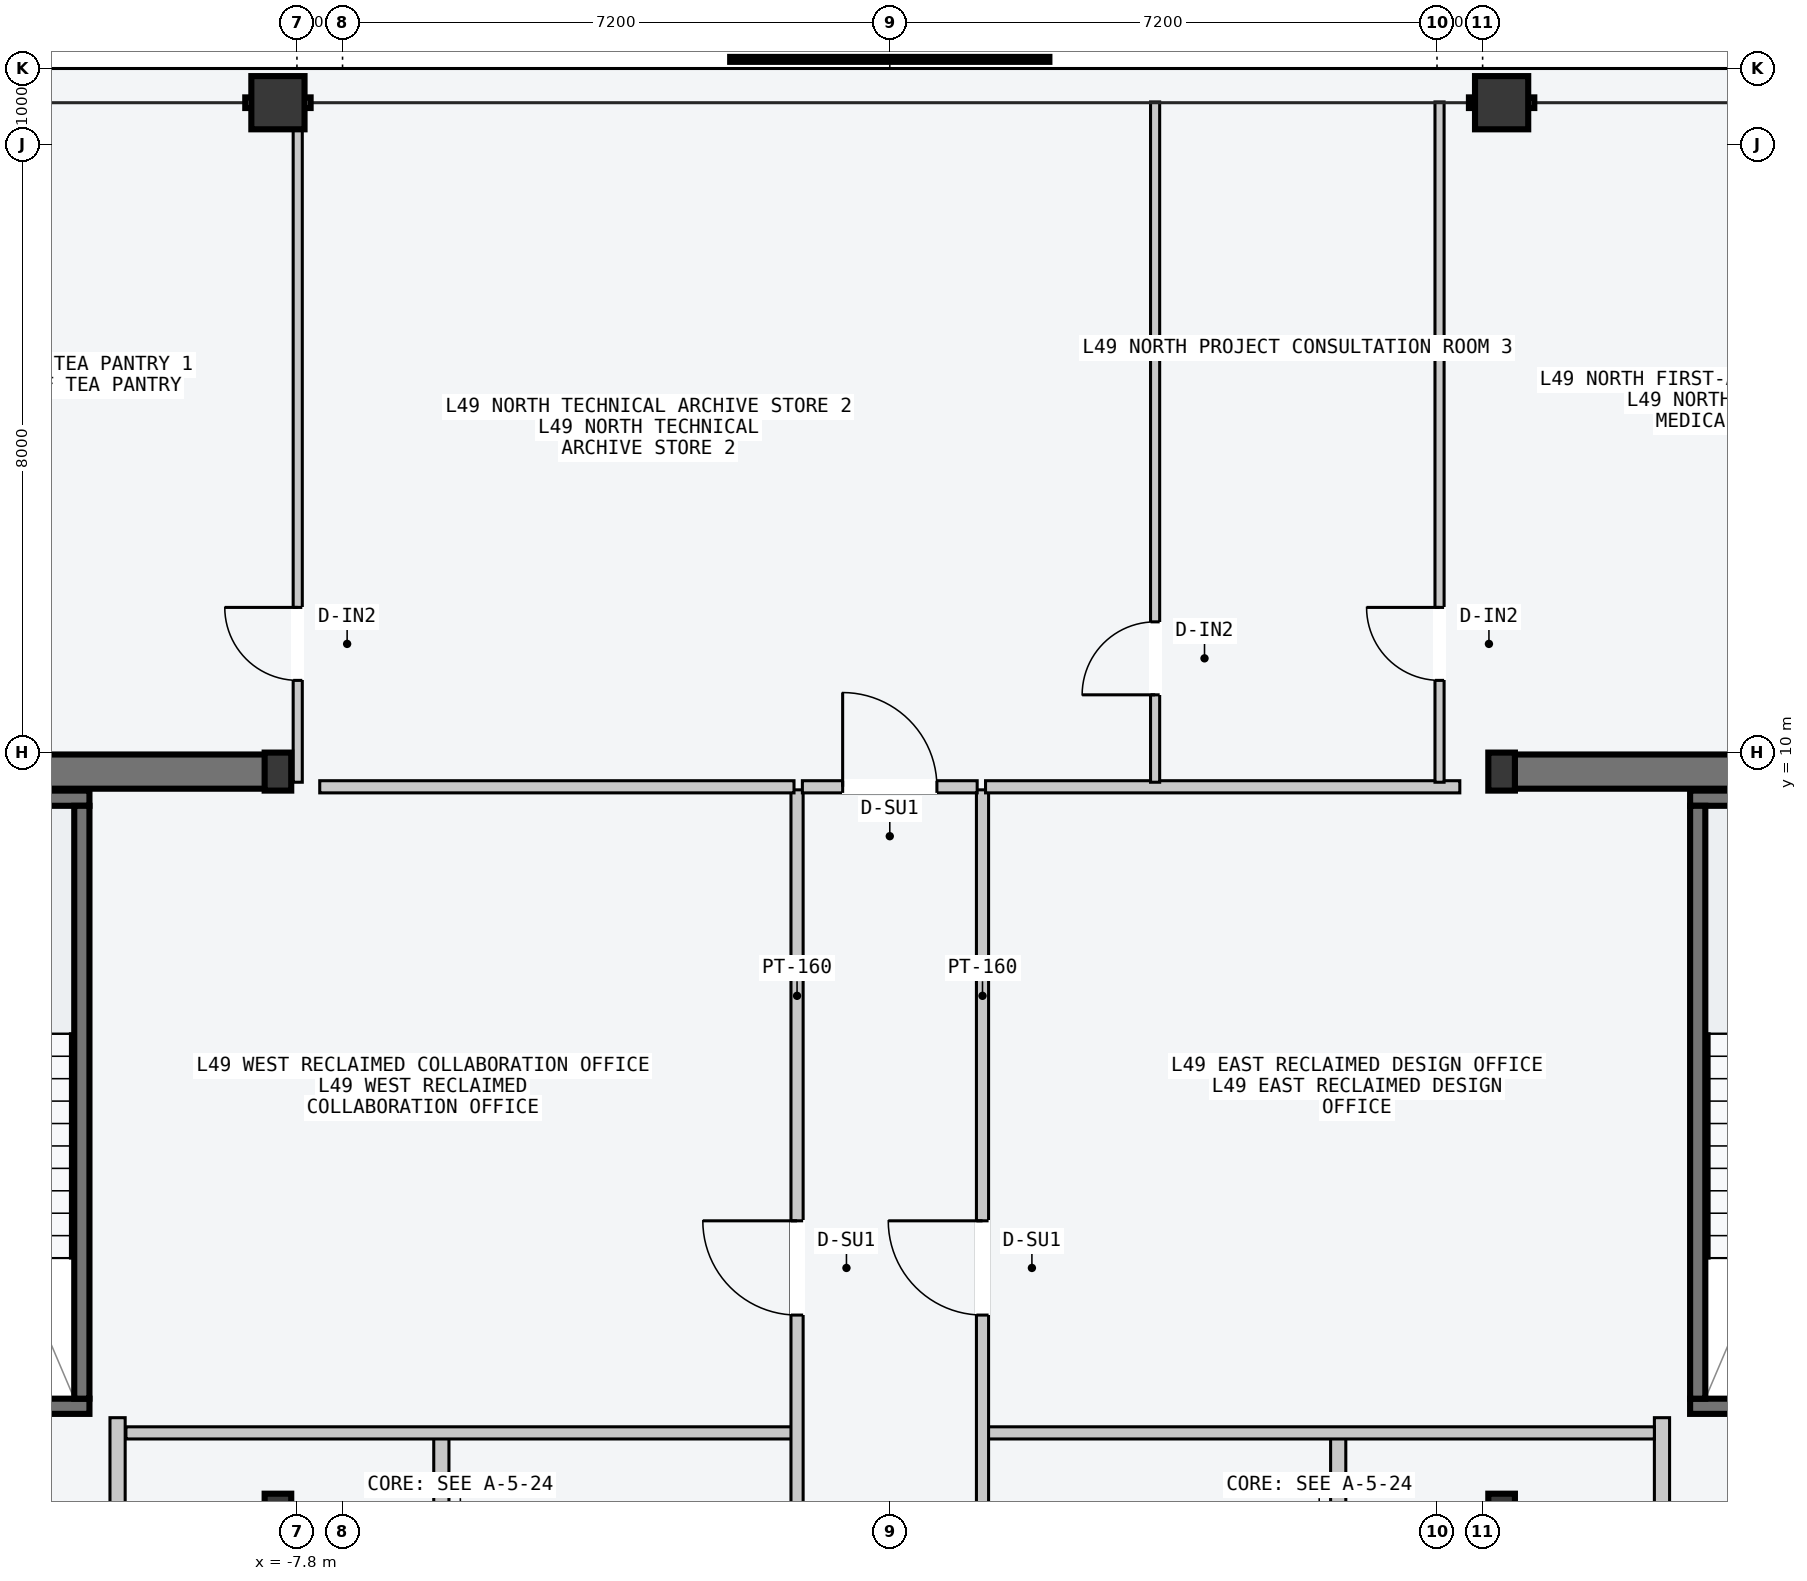
"""IFC4 building model, lengths in metres.
Left out: names, types, materials, properties, quantities, classifications, styles, units other than length and angle.
Written with IfcOpenShell. Run it as: python <this file> out.ifc"""

import sys

from ifc_helpers import new_model, si_unit, direction, frame, frame_2d, origin, origin_2d, place, context, subcontext, project, spatial, rectangle, hollow_rectangle, i_section, extrude, element, fill, save


model = new_model("IFC4")
c1 = context("Model", 3, precision=1e-05, world=origin(), true_north=direction((0.0, 1.0)))
c2 = subcontext(c1, "Body", "Model", "MODEL_VIEW")
j1 = project(units=[si_unit("LENGTHUNIT", "METRE"), si_unit("PLANEANGLEUNIT", "RADIAN")], contexts=[c1])
p1 = place(None, origin())
s1 = spatial("IfcSite", under=j1, at=p1, CompositionType="ELEMENT")
p2 = place(p1, origin())
s2 = spatial("IfcBuilding", under=s1, at=p2, CompositionType="ELEMENT")
p3 = place(p2, frame((0.0, 0.0, 187.5)))
s3 = spatial("IfcBuildingStorey", under=s2, at=p3, CompositionType="ELEMENT", Elevation=187.5)
for number, where, z_axis, x_axis in (
    (1, (-14.53, 9.75, -0.2), (0.0, 0.0, 1.0), (1.0, 0.0, 0.0)),
    (2, (8.07, 9.75, -0.2), (0.0, 0.0, 1.0), (1.0, 0.0, 0.0)),
):
    element("IfcWall", number, at=place(p3, frame(where, z_axis=z_axis, x_axis=x_axis)), inside=s3, PredefinedType="SHEAR", context=c2, shape_type="SweptSolid", body=[
        extrude(rectangle(XDim=6.46, YDim=0.45, at=frame_2d((3.23, 0.0))), origin(), (0.0, 0.0, 1.0), 3.6),
    ])
p4 = place(p3, frame((-14.25, 1.4, -0.2), z_axis=(0.0, 0.0, 1.0), x_axis=(1.0, 0.0, 0.0)))
e3 = element("IfcWall", 3, at=p4, inside=s3, PredefinedType="SOLIDWALL", context=c2, shape_type="SweptSolid", body=[
    extrude(rectangle(XDim=3.72, YDim=0.2, at=frame_2d((1.86, 0.0))), origin(), (0.0, 0.0, 1.0), 3.6),
])
p5 = place(p4, frame((1.5, 0.0, 0.2)))
e4 = element("IfcOpeningElement", 4, at=p5, cuts=e3, PredefinedType="OPENING", context=c2, shape_type="SweptSolid", body=[
    extrude(rectangle(XDim=1.12, YDim=2.18, at=frame_2d((0.56, 1.09))), frame((0.0, 0.11, 0.0), z_axis=(0.0, -1.0, 0.0), x_axis=(1.0, 0.0, 0.0)), (0.0, 0.0, 1.0), 0.22),
])
p6 = place(p3, frame((-14.25, 9.4, -0.2), z_axis=(0.0, 0.0, 1.0), x_axis=(1.0, 0.0, 0.0)))
e5 = element("IfcWall", 5, at=p6, inside=s3, PredefinedType="SOLIDWALL", context=c2, shape_type="SweptSolid", body=[
    extrude(rectangle(XDim=3.72, YDim=0.2, at=frame_2d((1.86, 0.0))), origin(), (0.0, 0.0, 1.0), 3.6),
])
p7 = place(p3, frame((-10.63, 1.5, -0.2), z_axis=(0.0, 0.0, 1.0), x_axis=(0.0, 1.0, 0.0)))
e6 = element("IfcWall", 6, at=p7, inside=s3, PredefinedType="SOLIDWALL", context=c2, shape_type="SweptSolid", body=[
    extrude(rectangle(XDim=7.8, YDim=0.2, at=frame_2d((3.9, 0.0))), origin(), (0.0, 0.0, 1.0), 3.6),
])
p8 = place(p3, frame((10.53, 1.4, -0.2), z_axis=(0.0, 0.0, 1.0), x_axis=(1.0, 0.0, 0.0)))
e7 = element("IfcWall", 7, at=p8, inside=s3, PredefinedType="SOLIDWALL", context=c2, shape_type="SweptSolid", body=[
    extrude(rectangle(XDim=3.72, YDim=0.2, at=frame_2d((1.86, 0.0))), origin(), (0.0, 0.0, 1.0), 3.6),
])
p9 = place(p8, frame((1.5, 0.0, 0.2)))
e8 = element("IfcOpeningElement", 8, at=p9, cuts=e7, PredefinedType="OPENING", context=c2, shape_type="SweptSolid", body=[
    extrude(rectangle(XDim=1.12, YDim=2.18, at=frame_2d((0.56, 1.09))), frame((0.0, 0.11, 0.0), z_axis=(0.0, -1.0, 0.0), x_axis=(1.0, 0.0, 0.0)), (0.0, 0.0, 1.0), 0.22),
])
p10 = place(p3, frame((10.53, 9.4, -0.2), z_axis=(0.0, 0.0, 1.0), x_axis=(1.0, 0.0, 0.0)))
e9 = element("IfcWall", 9, at=p10, inside=s3, PredefinedType="SOLIDWALL", context=c2, shape_type="SweptSolid", body=[
    extrude(rectangle(XDim=3.72, YDim=0.2, at=frame_2d((1.86, 0.0))), origin(), (0.0, 0.0, 1.0), 3.6),
])
p11 = place(p3, frame((10.63, 1.5, -0.2), z_axis=(0.0, 0.0, 1.0), x_axis=(0.0, 1.0, 0.0)))
e10 = element("IfcWall", 10, at=p11, inside=s3, PredefinedType="SOLIDWALL", context=c2, shape_type="SweptSolid", body=[
    extrude(rectangle(XDim=7.8, YDim=0.2, at=frame_2d((3.9, 0.0))), origin(), (0.0, 0.0, 1.0), 3.6),
])
for number, where, z_axis, x_axis in (
    (11, (-8.05, 0.0, 0.0), (0.0, 0.0, 1.0), (1.0, 0.0, 0.0)),
    (12, (-8.05, 9.75, 0.0), (0.0, 0.0, 1.0), (1.0, 0.0, 0.0)),
    (13, (8.05, 0.0, 0.0), (0.0, 0.0, 1.0), (1.0, 0.0, 0.0)),
    (14, (8.05, 9.75, 0.0), (0.0, 0.0, 1.0), (1.0, 0.0, 0.0)),
):
    element("IfcColumn", number, at=place(p3, frame(where, z_axis=z_axis, x_axis=x_axis)), inside=s3, PredefinedType="COLUMN", context=c2, shape_type="SweptSolid", body=[
        extrude(i_section(OverallWidth=0.35, OverallDepth=0.5, WebThickness=0.02, FlangeThickness=0.032, at=origin_2d()), origin(), (0.0, 0.0, 1.0), 3.6),
    ])
for number, where, z_axis, x_axis in (
    (15, (-8.05, 18.55, 0.0), (0.0, 0.0, 1.0), (1.0, 0.0, 0.0)),
    (16, (8.05, 18.55, 0.0), (0.0, 0.0, 1.0), (1.0, 0.0, 0.0)),
):
    element("IfcColumn", number, at=place(p3, frame(where, z_axis=z_axis, x_axis=x_axis)), inside=s3, PredefinedType="COLUMN", context=c2, shape_type="SweptSolid", body=[
        extrude(hollow_rectangle(XDim=0.7, YDim=0.7, WallThickness=0.03, at=origin_2d()), origin(), (0.0, 0.0, 1.0), 3.6),
    ])
p12 = place(p3, frame((-5.9, -9.45, 0.0), z_axis=(0.0, 0.0, 1.0), x_axis=(0.0, 1.0, 0.0)))
e17 = element("IfcWall", 17, at=p12, inside=s3, PredefinedType="PARTITIONING", context=c2, shape_type="SweptSolid", body=[
    extrude(rectangle(XDim=10.5, YDim=0.2, at=frame_2d((5.25, 0.0))), origin(), (0.0, 0.0, 1.0), 3.4),
])
p13 = place(p12, frame((3.9, 0.0, 0.0)))
e18 = element("IfcOpeningElement", 18, at=p13, cuts=e17, PredefinedType="OPENING", context=c2, shape_type="SweptSolid", body=[
    extrude(rectangle(XDim=1.5, YDim=2.2, at=frame_2d((0.75, 1.1))), frame((0.0, 0.11, 0.0), z_axis=(0.0, -1.0, 0.0), x_axis=(1.0, 0.0, 0.0)), (0.0, 0.0, 1.0), 0.22),
])
p14 = place(p3, frame((-10.16, -2.55, 0.0), z_axis=(0.0, 0.0, 1.0), x_axis=(0.0, 1.0, 0.0)))
e19 = element("IfcWall", 19, at=p14, inside=s3, PredefinedType="PARTITIONING", context=c2, shape_type="SweptSolid", body=[
    extrude(rectangle(XDim=3.8, YDim=0.2, at=frame_2d((1.9, 0.0))), origin(), (0.0, 0.0, 1.0), 3.4),
])
p15 = place(p14, frame((1.3, 0.0, 0.0)))
e20 = element("IfcOpeningElement", 20, at=p15, cuts=e19, PredefinedType="OPENING", context=c2, shape_type="SweptSolid", body=[
    extrude(rectangle(XDim=1.1, YDim=2.15, at=frame_2d((0.55, 1.075))), frame((0.0, 0.11, 0.0), z_axis=(0.0, -1.0, 0.0), x_axis=(1.0, 0.0, 0.0)), (0.0, 0.0, 1.0), 0.22),
])
p16 = place(p3, frame((5.9, -9.45, 0.0), z_axis=(0.0, 0.0, 1.0), x_axis=(0.0, 1.0, 0.0)))
e21 = element("IfcWall", 21, at=p16, inside=s3, PredefinedType="PARTITIONING", context=c2, shape_type="SweptSolid", body=[
    extrude(rectangle(XDim=10.5, YDim=0.2, at=frame_2d((5.25, 0.0))), origin(), (0.0, 0.0, 1.0), 3.4),
])
p17 = place(p16, frame((3.9, 0.0, 0.0)))
e22 = element("IfcOpeningElement", 22, at=p17, cuts=e21, PredefinedType="OPENING", context=c2, shape_type="SweptSolid", body=[
    extrude(rectangle(XDim=1.5, YDim=2.2, at=frame_2d((0.75, 1.1))), frame((0.0, 0.11, 0.0), z_axis=(0.0, -1.0, 0.0), x_axis=(1.0, 0.0, 0.0)), (0.0, 0.0, 1.0), 0.22),
])
p18 = place(p3, frame((10.16, -2.55, 0.0), z_axis=(0.0, 0.0, 1.0), x_axis=(0.0, 1.0, 0.0)))
e23 = element("IfcWall", 23, at=p18, inside=s3, PredefinedType="PARTITIONING", context=c2, shape_type="SweptSolid", body=[
    extrude(rectangle(XDim=3.8, YDim=0.2, at=frame_2d((1.9, 0.0))), origin(), (0.0, 0.0, 1.0), 3.4),
])
p19 = place(p18, frame((1.3, 0.0, 0.0)))
e24 = element("IfcOpeningElement", 24, at=p19, cuts=e23, PredefinedType="OPENING", context=c2, shape_type="SweptSolid", body=[
    extrude(rectangle(XDim=1.1, YDim=2.15, at=frame_2d((0.55, 1.075))), frame((0.0, 0.11, 0.0), z_axis=(0.0, -1.0, 0.0), x_axis=(1.0, 0.0, 0.0)), (0.0, 0.0, 1.0), 0.22),
])
p20 = place(p3, frame((-10.05, 1.05, 0.0), z_axis=(0.0, 0.0, 1.0), x_axis=(1.0, 0.0, 0.0)))
e25 = element("IfcWall", 25, at=p20, inside=s3, PredefinedType="PARTITIONING", context=c2, shape_type="SweptSolid", body=[
    extrude(rectangle(XDim=8.79, YDim=0.16, at=frame_2d((4.395, 0.0))), origin(), (0.0, 0.0, 1.0), 3.4),
])
p21 = place(p3, frame((-1.22, -3.5, 0.0), z_axis=(0.0, 0.0, 1.0), x_axis=(0.0, 1.0, 0.0)))
e26 = element("IfcWall", 26, at=p21, inside=s3, PredefinedType="PARTITIONING", context=c2, shape_type="SweptSolid", body=[
    extrude(rectangle(XDim=13.01, YDim=0.16, at=frame_2d((6.505, 0.0))), origin(), (0.0, 0.0, 1.0), 3.4),
])
p22 = place(p21, frame((6.1, 0.0, 0.0)))
e27 = element("IfcOpeningElement", 27, at=p22, cuts=e26, PredefinedType="OPENING", context=c2, shape_type="SweptSolid", body=[
    extrude(rectangle(XDim=1.24, YDim=2.24, at=frame_2d((0.62, 1.12))), frame((0.0, 0.09, 0.0), z_axis=(0.0, -1.0, 0.0), x_axis=(1.0, 0.0, 0.0)), (0.0, 0.0, 1.0), 0.18),
])
p23 = place(p21, frame((1.6, 0.0, 0.0)))
e28 = element("IfcOpeningElement", 28, at=p23, cuts=e26, PredefinedType="OPENING", context=c2, shape_type="SweptSolid", body=[
    extrude(rectangle(XDim=0.96, YDim=2.18, at=frame_2d((0.48, 1.09))), frame((0.0, 0.09, 0.0), z_axis=(0.0, -1.0, 0.0), x_axis=(1.0, 0.0, 0.0)), (0.0, 0.0, 1.0), 0.18),
])
p24 = place(p3, frame((-7.5, 9.55, 0.0), z_axis=(0.0, 0.0, 1.0), x_axis=(1.0, 0.0, 0.0)))
e29 = element("IfcWall", 29, at=p24, inside=s3, PredefinedType="PARTITIONING", context=c2, shape_type="SweptSolid", body=[
    extrude(rectangle(XDim=6.24, YDim=0.16, at=frame_2d((3.12, 0.0))), origin(), (0.0, 0.0, 1.0), 3.4),
])
p25 = place(p3, frame((1.26, 1.05, 0.0), z_axis=(0.0, 0.0, 1.0), x_axis=(1.0, 0.0, 0.0)))
e30 = element("IfcWall", 30, at=p25, inside=s3, PredefinedType="PARTITIONING", context=c2, shape_type="SweptSolid", body=[
    extrude(rectangle(XDim=8.8, YDim=0.16, at=frame_2d((4.4, 0.0))), origin(), (0.0, 0.0, 1.0), 3.4),
])
p26 = place(p3, frame((1.22, -3.5, 0.0), z_axis=(0.0, 0.0, 1.0), x_axis=(0.0, 1.0, 0.0)))
e31 = element("IfcWall", 31, at=p26, inside=s3, PredefinedType="PARTITIONING", context=c2, shape_type="SweptSolid", body=[
    extrude(rectangle(XDim=13.01, YDim=0.16, at=frame_2d((6.505, 0.0))), origin(), (0.0, 0.0, 1.0), 3.4),
])
p27 = place(p26, frame((6.1, 0.0, 0.0)))
e32 = element("IfcOpeningElement", 32, at=p27, cuts=e31, PredefinedType="OPENING", context=c2, shape_type="SweptSolid", body=[
    extrude(rectangle(XDim=1.24, YDim=2.24, at=frame_2d((0.62, 1.12))), frame((0.0, 0.09, 0.0), z_axis=(0.0, -1.0, 0.0), x_axis=(1.0, 0.0, 0.0)), (0.0, 0.0, 1.0), 0.18),
])
p28 = place(p26, frame((1.6, 0.0, 0.0)))
e33 = element("IfcOpeningElement", 33, at=p28, cuts=e31, PredefinedType="OPENING", context=c2, shape_type="SweptSolid", body=[
    extrude(rectangle(XDim=0.96, YDim=2.18, at=frame_2d((0.48, 1.09))), frame((0.0, 0.09, 0.0), z_axis=(0.0, -1.0, 0.0), x_axis=(1.0, 0.0, 0.0)), (0.0, 0.0, 1.0), 0.18),
])
p29 = place(p3, frame((1.26, 9.55, 0.0), z_axis=(0.0, 0.0, 1.0), x_axis=(1.0, 0.0, 0.0)))
e34 = element("IfcWall", 34, at=p29, inside=s3, PredefinedType="PARTITIONING", context=c2, shape_type="SweptSolid", body=[
    extrude(rectangle(XDim=6.24, YDim=0.16, at=frame_2d((3.12, 0.0))), origin(), (0.0, 0.0, 1.0), 3.4),
])
p30 = place(p3, frame((-7.79, 9.61, 0.0), z_axis=(0.0, 0.0, 1.0), x_axis=(0.0, 1.0, 0.0)))
e35 = element("IfcWall", 35, at=p30, inside=s3, PredefinedType="PARTITIONING", context=c2, shape_type="SweptSolid", body=[
    extrude(rectangle(XDim=8.95, YDim=0.12, at=frame_2d((4.475, 0.0))), origin(), (0.0, 0.0, 1.0), 3.4),
])
p31 = place(p30, frame((1.34, 0.0, 0.0)))
e36 = element("IfcOpeningElement", 36, at=p31, cuts=e35, PredefinedType="OPENING", context=c2, shape_type="SweptSolid", body=[
    extrude(rectangle(XDim=0.96, YDim=2.18, at=frame_2d((0.48, 1.09))), frame((0.0, 0.07, 0.0), z_axis=(0.0, -1.0, 0.0), x_axis=(1.0, 0.0, 0.0)), (0.0, 0.0, 1.0), 0.14),
])
p32 = place(p3, frame((3.491, 9.61, 0.0), z_axis=(0.0, 0.0, 1.0), x_axis=(0.0, 1.0, 0.0)))
e37 = element("IfcWall", 37, at=p32, inside=s3, PredefinedType="PARTITIONING", context=c2, shape_type="SweptSolid", body=[
    extrude(rectangle(XDim=8.95, YDim=0.12, at=frame_2d((4.475, 0.0))), origin(), (0.0, 0.0, 1.0), 3.4),
])
p33 = place(p32, frame((1.15, 0.0, 0.0)))
e38 = element("IfcOpeningElement", 38, at=p33, cuts=e37, PredefinedType="OPENING", context=c2, shape_type="SweptSolid", body=[
    extrude(rectangle(XDim=0.96, YDim=2.18, at=frame_2d((0.48, 1.09))), frame((0.0, 0.07, 0.0), z_axis=(0.0, -1.0, 0.0), x_axis=(1.0, 0.0, 0.0)), (0.0, 0.0, 1.0), 0.14),
])
p34 = place(p3, frame((7.233, 9.61, 0.0), z_axis=(0.0, 0.0, 1.0), x_axis=(0.0, 1.0, 0.0)))
e39 = element("IfcWall", 39, at=p34, inside=s3, PredefinedType="PARTITIONING", context=c2, shape_type="SweptSolid", body=[
    extrude(rectangle(XDim=8.95, YDim=0.12, at=frame_2d((4.475, 0.0))), origin(), (0.0, 0.0, 1.0), 3.4),
])
p35 = place(p34, frame((1.34, 0.0, 0.0)))
e40 = element("IfcOpeningElement", 40, at=p35, cuts=e39, PredefinedType="OPENING", context=c2, shape_type="SweptSolid", body=[
    extrude(rectangle(XDim=0.96, YDim=2.18, at=frame_2d((0.48, 1.09))), frame((0.0, 0.07, 0.0), z_axis=(0.0, -1.0, 0.0), x_axis=(1.0, 0.0, 0.0)), (0.0, 0.0, 1.0), 0.14),
])
p36 = place(p3, frame((-1.15, 9.55, 0.0), z_axis=(0.0, 0.0, 1.0), x_axis=(1.0, 0.0, 0.0)))
e41 = element("IfcWall", 41, at=p36, inside=s3, PredefinedType="PARTITIONING", context=c2, shape_type="SweptSolid", body=[
    extrude(rectangle(XDim=2.3, YDim=0.16, at=frame_2d((1.15, 0.0))), origin(), (0.0, 0.0, 1.0), 3.4),
])
p37 = place(p36, frame((0.53, 0.0, 0.0)))
e42 = element("IfcOpeningElement", 42, at=p37, cuts=e41, PredefinedType="OPENING", context=c2, shape_type="SweptSolid", body=[
    extrude(rectangle(XDim=1.24, YDim=2.24, at=frame_2d((0.62, 1.12))), frame((0.0, 0.09, 0.0), z_axis=(0.0, -1.0, 0.0), x_axis=(1.0, 0.0, 0.0)), (0.0, 0.0, 1.0), 0.18),
])
p38 = place(p22, origin())
e43 = element("IfcDoor", 43, at=p38, inside=s3, OperationType="SINGLE_SWING_RIGHT", PredefinedType="DOOR", context=c2, shape_type="SweptSolid", body=[
    extrude(rectangle(XDim=1.24, YDim=2.24, at=frame_2d((0.62, 1.12))), frame((0.0, 0.025, 0.0), z_axis=(0.0, -1.0, 0.0), x_axis=(1.0, 0.0, 0.0)), (0.0, 0.0, 1.0), 0.05),
])
fill(e27, e43)
p39 = place(p27, origin())
e44 = element("IfcDoor", 44, at=p39, inside=s3, OperationType="SINGLE_SWING_RIGHT", PredefinedType="DOOR", context=c2, shape_type="SweptSolid", body=[
    extrude(rectangle(XDim=1.24, YDim=2.24, at=frame_2d((0.62, 1.12))), frame((0.0, 0.025, 0.0), z_axis=(0.0, -1.0, 0.0), x_axis=(1.0, 0.0, 0.0)), (0.0, 0.0, 1.0), 0.05),
])
fill(e32, e44)
p40 = place(p31, origin())
e45 = element("IfcDoor", 45, at=p40, inside=s3, OperationType="SINGLE_SWING_RIGHT", PredefinedType="DOOR", context=c2, shape_type="SweptSolid", body=[
    extrude(rectangle(XDim=0.96, YDim=2.18, at=frame_2d((0.48, 1.09))), frame((0.0, 0.025, 0.0), z_axis=(0.0, -1.0, 0.0), x_axis=(1.0, 0.0, 0.0)), (0.0, 0.0, 1.0), 0.05),
])
fill(e36, e45)
p41 = place(p33, origin())
e46 = element("IfcDoor", 46, at=p41, inside=s3, OperationType="SINGLE_SWING_LEFT", PredefinedType="DOOR", context=c2, shape_type="SweptSolid", body=[
    extrude(rectangle(XDim=0.96, YDim=2.18, at=frame_2d((0.48, 1.09))), frame((0.0, 0.025, 0.0), z_axis=(0.0, -1.0, 0.0), x_axis=(1.0, 0.0, 0.0)), (0.0, 0.0, 1.0), 0.05),
])
fill(e38, e46)
p42 = place(p35, origin())
e47 = element("IfcDoor", 47, at=p42, inside=s3, OperationType="SINGLE_SWING_RIGHT", PredefinedType="DOOR", context=c2, shape_type="SweptSolid", body=[
    extrude(rectangle(XDim=0.96, YDim=2.18, at=frame_2d((0.48, 1.09))), frame((0.0, 0.025, 0.0), z_axis=(0.0, -1.0, 0.0), x_axis=(1.0, 0.0, 0.0)), (0.0, 0.0, 1.0), 0.05),
])
fill(e40, e47)
p43 = place(p37, origin())
e48 = element("IfcDoor", 48, at=p43, inside=s3, OperationType="SINGLE_SWING_LEFT", PredefinedType="DOOR", context=c2, shape_type="SweptSolid", body=[
    extrude(rectangle(XDim=1.24, YDim=2.24, at=frame_2d((0.62, 1.12))), frame((0.0, 0.025, 0.0), z_axis=(0.0, -1.0, 0.0), x_axis=(1.0, 0.0, 0.0)), (0.0, 0.0, 1.0), 0.05),
])
fill(e42, e48)
save(model, sys.argv[1])
